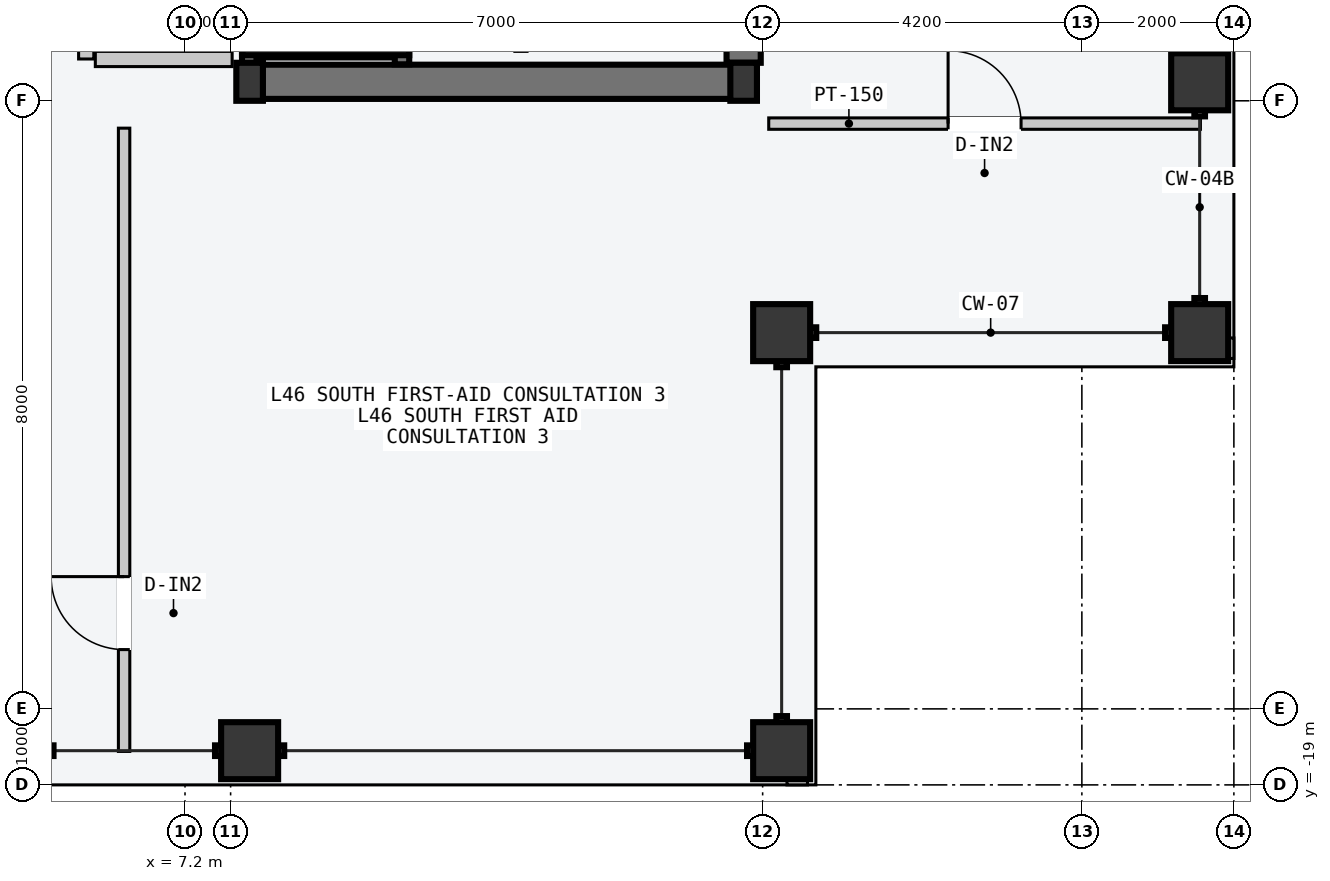
"""IFC4 building model, lengths in metres.
Left out: names, types, materials, properties, quantities, classifications, styles, units other than length and angle.
Written with IfcOpenShell. Run it as: python <this file> out.ifc"""

import sys

from ifc_helpers import new_model, si_unit, direction, frame, frame_2d, origin, origin_2d, place, context, subcontext, project, spatial, rectangle, hollow_rectangle, i_section, extrude, element, fill, save


model = new_model("IFC4")
c1 = context("Model", 3, precision=1e-05, world=origin(), true_north=direction((0.0, 1.0)))
c2 = subcontext(c1, "Body", "Model", "MODEL_VIEW")
j1 = project(units=[si_unit("LENGTHUNIT", "METRE"), si_unit("PLANEANGLEUNIT", "RADIAN")], contexts=[c1])
p1 = place(None, origin())
s1 = spatial("IfcSite", under=j1, at=p1, CompositionType="ELEMENT")
p2 = place(p1, origin())
s2 = spatial("IfcBuilding", under=s1, at=p2, CompositionType="ELEMENT")
p3 = place(p2, frame((0.0, 0.0, 176.7)))
s3 = spatial("IfcBuildingStorey", under=s2, at=p3, CompositionType="ELEMENT", Elevation=176.7)
p4 = place(p3, frame((8.07, -9.75, -0.2), z_axis=(0.0, 0.0, 1.0), x_axis=(1.0, 0.0, 0.0)))
e1 = element("IfcWall", 1, at=p4, inside=s3, PredefinedType="SHEAR", context=c2, shape_type="SweptSolid", body=[
    extrude(rectangle(XDim=6.46, YDim=0.45, at=frame_2d((3.23, 0.0))), origin(), (0.0, 0.0, 1.0), 3.6),
])
p5 = place(p3, frame((14.55, -9.5, -0.2), z_axis=(0.0, 0.0, 1.0), x_axis=(0.0, 1.0, 0.0)))
e2 = element("IfcWall", 2, at=p5, inside=s3, PredefinedType="SHEAR", context=c2, shape_type="SweptSolid", body=[
    extrude(rectangle(XDim=9.25, YDim=0.45, at=frame_2d((4.625, 0.0))), origin(), (0.0, 0.0, 1.0), 3.6),
])
for number, where, z_axis, x_axis in (
    (3, (8.05, -9.75, 0.0), (0.0, 0.0, 1.0), (1.0, 0.0, 0.0)),
    (4, (14.55, -9.75, 0.0), (0.0, 0.0, 1.0), (1.0, 0.0, 0.0)),
):
    element("IfcColumn", number, at=place(p3, frame(where, z_axis=z_axis, x_axis=x_axis)), inside=s3, PredefinedType="COLUMN", context=c2, shape_type="SweptSolid", body=[
        extrude(i_section(OverallWidth=0.35, OverallDepth=0.5, WebThickness=0.02, FlangeThickness=0.032, at=origin_2d()), origin(), (0.0, 0.0, 1.0), 3.6),
    ])
for number, where, z_axis, x_axis in (
    (5, (8.05, -18.55, 0.0), (0.0, 0.0, 1.0), (1.0, 0.0, 0.0)),
    (6, (15.05, -18.55, 0.0), (0.0, 0.0, 1.0), (1.0, 0.0, 0.0)),
    (7, (20.55, -13.05, 0.0), (0.0, 0.0, 1.0), (0.0, 1.0, 0.0)),
    (8, (20.55, -9.75, 0.0), (0.0, 0.0, 1.0), (0.0, 1.0, 0.0)),
    (9, (15.05, -13.05, 0.0), (0.0, 0.0, 1.0), (1.0, 0.0, 0.0)),
):
    element("IfcColumn", number, at=place(p3, frame(where, z_axis=z_axis, x_axis=x_axis)), inside=s3, PredefinedType="COLUMN", context=c2, shape_type="SweptSolid", body=[
        extrude(hollow_rectangle(XDim=0.75, YDim=0.75, WallThickness=0.032, at=origin_2d()), origin(), (0.0, 0.0, 1.0), 3.6),
    ])
for number, where, z_axis, x_axis in (
    (10, (15.12, -18.89, 0.0), (0.0, 0.0, 1.0), (1.0, 0.0, 0.0)),
    (11, (20.89, -13.39, 0.0), (0.0, 0.0, 1.0), (0.0, 1.0, 0.0)),
):
    element("IfcWall", number, at=place(p3, frame(where, z_axis=z_axis, x_axis=x_axis)), inside=s3, PredefinedType="PARAPET", context=c2, shape_type="SweptSolid", body=[
        extrude(rectangle(XDim=0.27, YDim=0.22, at=frame_2d((0.135, 0.0))), origin(), (0.0, 0.0, 1.0), 1.2),
    ])
p6 = place(p3, frame((8.045, -9.52, -0.2), z_axis=(0.0, 0.0, 1.0), x_axis=(0.0, 1.0, 0.0)))
e12 = element("IfcWall", 12, at=p6, inside=s3, PredefinedType="SOLIDWALL", context=c2, shape_type="SweptSolid", body=[
    extrude(rectangle(XDim=2.12, YDim=0.19, at=frame_2d((1.06, 0.0))), origin(), (0.0, 0.0, 1.0), 3.6),
])
p7 = place(p6, frame((0.57, 0.0, 0.2)))
e13 = element("IfcOpeningElement", 13, at=p7, cuts=e12, PredefinedType="OPENING", context=c2, shape_type="SweptSolid", body=[
    extrude(rectangle(XDim=1.1, YDim=2.2, at=frame_2d((0.55, 1.1))), frame((0.0, 0.105, 0.0), z_axis=(0.0, -1.0, 0.0), x_axis=(1.0, 0.0, 0.0)), (0.0, 0.0, 1.0), 0.21),
])
p8 = place(p3, frame((10.055, -9.52, -0.2), z_axis=(0.0, 0.0, 1.0), x_axis=(0.0, 1.0, 0.0)))
e14 = element("IfcWall", 14, at=p8, inside=s3, PredefinedType="SOLIDWALL", context=c2, shape_type="SweptSolid", body=[
    extrude(rectangle(XDim=2.12, YDim=0.19, at=frame_2d((1.06, 0.0))), origin(), (0.0, 0.0, 1.0), 3.6),
])
p9 = place(p3, frame((7.95, -9.305, -0.2), z_axis=(0.0, 0.0, 1.0), x_axis=(1.0, 0.0, 0.0)))
e15 = element("IfcWall", 15, at=p9, inside=s3, PredefinedType="SOLIDWALL", context=c2, shape_type="SweptSolid", body=[
    extrude(rectangle(XDim=2.2, YDim=0.19, at=frame_2d((1.1, 0.0))), origin(), (0.0, 0.0, 1.0), 3.6),
])
p10 = place(p3, frame((5.9, -9.45, 0.0), z_axis=(0.0, 0.0, 1.0), x_axis=(0.0, 1.0, 0.0)))
e16 = element("IfcWall", 16, at=p10, inside=s3, PredefinedType="PARTITIONING", context=c2, shape_type="SweptSolid", body=[
    extrude(rectangle(XDim=10.5, YDim=0.2, at=frame_2d((5.25, 0.0))), origin(), (0.0, 0.0, 1.0), 3.4),
])
p11 = place(p10, frame((3.9, 0.0, 0.0)))
e17 = element("IfcOpeningElement", 17, at=p11, cuts=e16, PredefinedType="OPENING", context=c2, shape_type="SweptSolid", body=[
    extrude(rectangle(XDim=1.5, YDim=2.2, at=frame_2d((0.75, 1.1))), frame((0.0, 0.11, 0.0), z_axis=(0.0, -1.0, 0.0), x_axis=(1.0, 0.0, 0.0)), (0.0, 0.0, 1.0), 0.22),
])
p12 = place(p3, frame((6.02, -9.45, 0.0), z_axis=(0.0, 0.0, 1.0), x_axis=(1.0, 0.0, 0.0)))
e18 = element("IfcWall", 18, at=p12, inside=s3, PredefinedType="PARTITIONING", context=c2, shape_type="SweptSolid", body=[
    extrude(rectangle(XDim=1.8, YDim=0.2, at=frame_2d((0.9, 0.0))), origin(), (0.0, 0.0, 1.0), 3.4),
])
p13 = place(p3, frame((6.399, -18.56, 0.0), z_axis=(0.0, 0.0, 1.0), x_axis=(0.0, 1.0, 0.0)))
e19 = element("IfcWall", 19, at=p13, inside=s3, PredefinedType="PARTITIONING", context=c2, shape_type="SweptSolid", body=[
    extrude(rectangle(XDim=8.2, YDim=0.15, at=frame_2d((4.1, 0.0))), origin(), (0.0, 0.0, 1.0), 3.4),
])
p14 = place(p13, frame((1.34, 0.0, 0.0)))
e20 = element("IfcOpeningElement", 20, at=p14, cuts=e19, PredefinedType="OPENING", context=c2, shape_type="SweptSolid", body=[
    extrude(rectangle(XDim=0.96, YDim=2.18, at=frame_2d((0.48, 1.09))), frame((0.0, 0.085, 0.0), z_axis=(0.0, -1.0, 0.0), x_axis=(1.0, 0.0, 0.0)), (0.0, 0.0, 1.0), 0.17),
])
p15 = place(p3, frame((14.88, -10.3, 0.0), z_axis=(0.0, 0.0, 1.0), x_axis=(1.0, 0.0, 0.0)))
e21 = element("IfcWall", 21, at=p15, inside=s3, PredefinedType="PARTITIONING", context=c2, shape_type="SweptSolid", body=[
    extrude(rectangle(XDim=5.68, YDim=0.15, at=frame_2d((2.84, 0.0))), origin(), (0.0, 0.0, 1.0), 3.4),
])
p16 = place(p15, frame((2.36, 0.0, 0.0)))
e22 = element("IfcOpeningElement", 22, at=p16, cuts=e21, PredefinedType="OPENING", context=c2, shape_type="SweptSolid", body=[
    extrude(rectangle(XDim=0.96, YDim=2.18, at=frame_2d((0.48, 1.09))), frame((0.0, 0.085, 0.0), z_axis=(0.0, -1.0, 0.0), x_axis=(1.0, 0.0, 0.0)), (0.0, 0.0, 1.0), 0.17),
])
p17 = place(p14, origin())
e23 = element("IfcDoor", 23, at=p17, inside=s3, OperationType="SINGLE_SWING_RIGHT", PredefinedType="DOOR", context=c2, shape_type="SweptSolid", body=[
    extrude(rectangle(XDim=0.96, YDim=2.18, at=frame_2d((0.48, 1.09))), frame((0.0, 0.025, 0.0), z_axis=(0.0, -1.0, 0.0), x_axis=(1.0, 0.0, 0.0)), (0.0, 0.0, 1.0), 0.05),
])
fill(e20, e23)
p18 = place(p16, origin())
e24 = element("IfcDoor", 24, at=p18, inside=s3, OperationType="SINGLE_SWING_LEFT", PredefinedType="DOOR", context=c2, shape_type="SweptSolid", body=[
    extrude(rectangle(XDim=0.96, YDim=2.18, at=frame_2d((0.48, 1.09))), frame((0.0, 0.025, 0.0), z_axis=(0.0, -1.0, 0.0), x_axis=(1.0, 0.0, 0.0)), (0.0, 0.0, 1.0), 0.05),
])
fill(e22, e24)
save(model, sys.argv[1])
